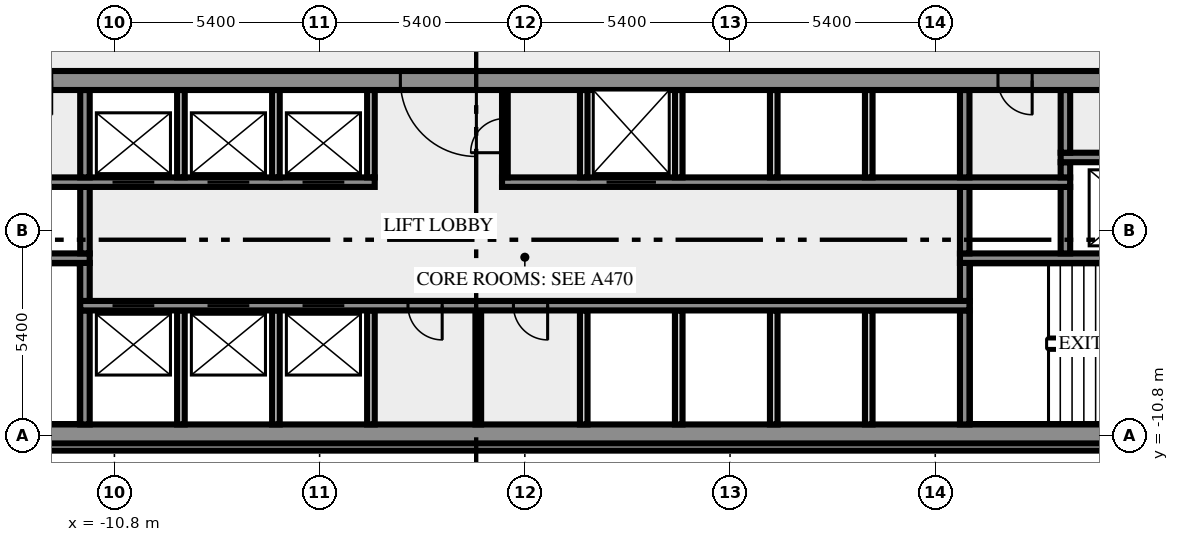
"""IFC4 building model, lengths in metres.
Left out: names, types, materials, properties, quantities, classifications, styles, units other than length and angle.
Written with IfcOpenShell. Run it as: python <this file> out.ifc"""

import sys

from ifc_helpers import new_model, si_unit, direction, frame, frame_2d, origin, place, context, subcontext, project, spatial, rectangle, extrude, element, fill, save


model = new_model("IFC4")
c1 = context("Model", 3, precision=1e-05, world=origin(), true_north=direction((0.0, 1.0)))
c2 = subcontext(c1, "Body", "Model", "MODEL_VIEW")
j1 = project(units=[si_unit("LENGTHUNIT", "METRE"), si_unit("PLANEANGLEUNIT", "RADIAN")], contexts=[c1])
p1 = place(None, origin())
s1 = spatial("IfcSite", under=j1, at=p1, CompositionType="ELEMENT")
p2 = place(p1, origin())
s2 = spatial("IfcBuilding", under=s1, at=p2, CompositionType="ELEMENT")
p3 = place(p2, frame((0.0, 0.0, 109.0)))
s3 = spatial("IfcBuildingStorey", under=s2, at=p3, CompositionType="ELEMENT", Elevation=109.0)
p4 = place(p3, frame((-17.444, -11.088, 0.0), z_axis=(0.0, 0.0, 1.0), x_axis=(1.0, 0.0, 0.0)))
e1 = element("IfcWall", 1, at=p4, inside=s3, PredefinedType="SOLIDWALL", context=c2, shape_type="SweptSolid", body=[
    extrude(rectangle(XDim=34.888, YDim=0.2, at=frame_2d((17.444, 0.0))), origin(), (0.0, 0.0, 1.0), 3.65),
])
p5 = place(p3, frame((-20.0, -10.75, 0.0), z_axis=(0.0, 0.0, 1.0), x_axis=(1.0, 0.0, 0.0)))
e2 = element("IfcWall", 2, at=p5, inside=s3, PredefinedType="SHEAR", context=c2, shape_type="SweptSolid", body=[
    extrude(rectangle(XDim=40.0, YDim=0.5, at=frame_2d((20.0, 0.0))), origin(), (0.0, 0.0, 1.0), 3.65),
])
p6 = place(p5, frame((0.8, 0.0, 1.0)))
e3 = element("IfcOpeningElement", 3, at=p6, cuts=e2, PredefinedType="OPENING", context=c2, shape_type="SweptSolid", body=[
    extrude(rectangle(XDim=1.2, YDim=1.2, at=frame_2d((0.6, 0.6))), frame((0.0, 0.26, 0.0), z_axis=(0.0, -1.0, 0.0), x_axis=(1.0, 0.0, 0.0)), (0.0, 0.0, 1.0), 0.52),
])
p7 = place(p5, frame((38.0, 0.0, 1.0)))
e4 = element("IfcOpeningElement", 4, at=p7, cuts=e2, PredefinedType="OPENING", context=c2, shape_type="SweptSolid", body=[
    extrude(rectangle(XDim=1.2, YDim=1.2, at=frame_2d((0.6, 0.6))), frame((0.0, 0.26, 0.0), z_axis=(0.0, -1.0, 0.0), x_axis=(1.0, 0.0, 0.0)), (0.0, 0.0, 1.0), 0.52),
])
p8 = place(p3, frame((-11.575, -10.5, 0.0), z_axis=(0.0, 0.0, 1.0), x_axis=(0.0, 1.0, 0.0)))
e5 = element("IfcWall", 5, at=p8, inside=s3, PredefinedType="SHEAR", context=c2, shape_type="SweptSolid", body=[
    extrude(rectangle(XDim=3.0, YDim=0.25, at=frame_2d((1.5, 0.0))), origin(), (0.0, 0.0, 1.0), 3.65),
])
for number, where, z_axis, x_axis in (
    (6, (-9.05, -10.5, 0.0), (0.0, 0.0, 1.0), (0.0, 1.0, 0.0)),
    (7, (-6.55, -10.5, 0.0), (0.0, 0.0, 1.0), (0.0, 1.0, 0.0)),
    (8, (-4.05, -10.5, 0.0), (0.0, 0.0, 1.0), (0.0, 1.0, 0.0)),
):
    element("IfcWall", number, at=place(p3, frame(where, z_axis=z_axis, x_axis=x_axis)), inside=s3, PredefinedType="SOLIDWALL", context=c2, shape_type="SweptSolid", body=[
        extrude(rectangle(XDim=3.0, YDim=0.2, at=frame_2d((1.5, 0.0))), origin(), (0.0, 0.0, 1.0), 3.65),
    ])
p9 = place(p3, frame((-1.225, -10.5, 0.0), z_axis=(0.0, 0.0, 1.0), x_axis=(0.0, 1.0, 0.0)))
e9 = element("IfcWall", 9, at=p9, inside=s3, PredefinedType="PARTITIONING", context=c2, shape_type="SweptSolid", body=[
    extrude(rectangle(XDim=3.0, YDim=0.15, at=frame_2d((1.5, 0.0))), origin(), (0.0, 0.0, 1.0), 3.65),
])
for number, where, z_axis, x_axis in (
    (10, (1.55, -10.5, 0.0), (0.0, 0.0, 1.0), (0.0, 1.0, 0.0)),
    (11, (4.05, -10.5, 0.0), (0.0, 0.0, 1.0), (0.0, 1.0, 0.0)),
    (12, (6.55, -10.5, 0.0), (0.0, 0.0, 1.0), (0.0, 1.0, 0.0)),
    (13, (9.05, -10.5, 0.0), (0.0, 0.0, 1.0), (0.0, 1.0, 0.0)),
):
    element("IfcWall", number, at=place(p3, frame(where, z_axis=z_axis, x_axis=x_axis)), inside=s3, PredefinedType="SOLIDWALL", context=c2, shape_type="SweptSolid", body=[
        extrude(rectangle(XDim=3.0, YDim=0.2, at=frame_2d((1.5, 0.0))), origin(), (0.0, 0.0, 1.0), 3.65),
    ])
p10 = place(p3, frame((11.575, -10.5, 0.0), z_axis=(0.0, 0.0, 1.0), x_axis=(0.0, 1.0, 0.0)))
e14 = element("IfcWall", 14, at=p10, inside=s3, PredefinedType="SHEAR", context=c2, shape_type="SweptSolid", body=[
    extrude(rectangle(XDim=3.0, YDim=0.25, at=frame_2d((1.5, 0.0))), origin(), (0.0, 0.0, 1.0), 3.65),
])
p11 = place(p3, frame((11.7, -7.375, 0.0), z_axis=(0.0, 0.0, 1.0), x_axis=(-1.0, 0.0, 0.0)))
e15 = element("IfcWall", 15, at=p11, inside=s3, PredefinedType="SHEAR", context=c2, shape_type="SweptSolid", body=[
    extrude(rectangle(XDim=23.4, YDim=0.25, at=frame_2d((11.7, 0.0))), origin(), (0.0, 0.0, 1.0), 3.65),
])
p12 = place(p11, frame((21.45, 0.0, 0.0)))
e16 = element("IfcOpeningElement", 16, at=p12, cuts=e15, PredefinedType="OPENING", context=c2, shape_type="SweptSolid", body=[
    extrude(rectangle(XDim=1.1, YDim=2.1, at=frame_2d((0.55, 1.05))), frame((0.0, 0.135, 0.0), z_axis=(0.0, -1.0, 0.0), x_axis=(1.0, 0.0, 0.0)), (0.0, 0.0, 1.0), 0.27),
])
p13 = place(p11, frame((18.95, 0.0, 0.0)))
e17 = element("IfcOpeningElement", 17, at=p13, cuts=e15, PredefinedType="OPENING", context=c2, shape_type="SweptSolid", body=[
    extrude(rectangle(XDim=1.1, YDim=2.1, at=frame_2d((0.55, 1.05))), frame((0.0, 0.135, 0.0), z_axis=(0.0, -1.0, 0.0), x_axis=(1.0, 0.0, 0.0)), (0.0, 0.0, 1.0), 0.27),
])
p14 = place(p11, frame((16.45, 0.0, 0.0)))
e18 = element("IfcOpeningElement", 18, at=p14, cuts=e15, PredefinedType="OPENING", context=c2, shape_type="SweptSolid", body=[
    extrude(rectangle(XDim=1.1, YDim=2.1, at=frame_2d((0.55, 1.05))), frame((0.0, 0.135, 0.0), z_axis=(0.0, -1.0, 0.0), x_axis=(1.0, 0.0, 0.0)), (0.0, 0.0, 1.0), 0.27),
])
p15 = place(p11, frame((13.875, 0.0, 0.0)))
e19 = element("IfcOpeningElement", 19, at=p15, cuts=e15, PredefinedType="OPENING", context=c2, shape_type="SweptSolid", body=[
    extrude(rectangle(XDim=0.9, YDim=2.1, at=frame_2d((0.45, 1.05))), frame((0.0, 0.135, 0.0), z_axis=(0.0, -1.0, 0.0), x_axis=(1.0, 0.0, 0.0)), (0.0, 0.0, 1.0), 0.27),
])
p16 = place(p11, frame((11.1, 0.0, 0.0)))
e20 = element("IfcOpeningElement", 20, at=p16, cuts=e15, PredefinedType="OPENING", context=c2, shape_type="SweptSolid", body=[
    extrude(rectangle(XDim=0.9, YDim=2.1, at=frame_2d((0.45, 1.05))), frame((0.0, 0.135, 0.0), z_axis=(0.0, -1.0, 0.0), x_axis=(1.0, 0.0, 0.0)), (0.0, 0.0, 1.0), 0.27),
])
for number, where, z_axis, x_axis in (
    (21, (-11.575, -7.25, 0.0), (0.0, 0.0, 1.0), (0.0, 1.0, 0.0)),
    (22, (11.575, -7.25, 0.0), (0.0, 0.0, 1.0), (0.0, 1.0, 0.0)),
):
    element("IfcWall", number, at=place(p3, frame(where, z_axis=z_axis, x_axis=x_axis)), inside=s3, PredefinedType="SHEAR", context=c2, shape_type="SweptSolid", body=[
        extrude(rectangle(XDim=1.0, YDim=0.25, at=frame_2d((0.5, 0.0))), origin(), (0.0, 0.0, 1.0), 3.65),
    ])
p17 = place(p3, frame((-11.45, -6.125, 0.0), z_axis=(0.0, 0.0, 1.0), x_axis=(-1.0, 0.0, 0.0)))
e23 = element("IfcWall", 23, at=p17, inside=s3, PredefinedType="SHEAR", context=c2, shape_type="SweptSolid", body=[
    extrude(rectangle(XDim=8.05, YDim=0.25, at=frame_2d((4.025, 0.0))), origin(), (0.0, 0.0, 1.0), 3.65),
])
p18 = place(p17, frame((6.2, 0.0, 0.0)))
e24 = element("IfcOpeningElement", 24, at=p18, cuts=e23, PredefinedType="OPENING", context=c2, shape_type="SweptSolid", body=[
    extrude(rectangle(XDim=1.8, YDim=2.1, at=frame_2d((0.9, 1.05))), frame((0.0, 0.135, 0.0), z_axis=(0.0, -1.0, 0.0), x_axis=(1.0, 0.0, 0.0)), (0.0, 0.0, 1.0), 0.27),
])
p19 = place(p3, frame((19.5, -6.125, 0.0), z_axis=(0.0, 0.0, 1.0), x_axis=(-1.0, 0.0, 0.0)))
e25 = element("IfcWall", 25, at=p19, inside=s3, PredefinedType="SHEAR", context=c2, shape_type="SweptSolid", body=[
    extrude(rectangle(XDim=8.05, YDim=0.25, at=frame_2d((4.025, 0.0))), origin(), (0.0, 0.0, 1.0), 3.65),
])
p20 = place(p19, frame((0.05, 0.0, 0.0)))
e26 = element("IfcOpeningElement", 26, at=p20, cuts=e25, PredefinedType="OPENING", context=c2, shape_type="SweptSolid", body=[
    extrude(rectangle(XDim=1.8, YDim=2.1, at=frame_2d((0.9, 1.05))), frame((0.0, 0.135, 0.0), z_axis=(0.0, -1.0, 0.0), x_axis=(1.0, 0.0, 0.0)), (0.0, 0.0, 1.0), 0.27),
])
for number, where, z_axis, x_axis in (
    (27, (-11.575, -6.0, 0.0), (0.0, 0.0, 1.0), (0.0, 1.0, 0.0)),
    (28, (11.575, -6.0, 0.0), (0.0, 0.0, 1.0), (0.0, 1.0, 0.0)),
    (29, (14.225, -6.0, 0.0), (0.0, 0.0, 1.0), (0.0, 1.0, 0.0)),
):
    element("IfcWall", number, at=place(p3, frame(where, z_axis=z_axis, x_axis=x_axis)), inside=s3, PredefinedType="SHEAR", context=c2, shape_type="SweptSolid", body=[
        extrude(rectangle(XDim=1.75, YDim=0.25, at=frame_2d((0.875, 0.0))), origin(), (0.0, 0.0, 1.0), 3.65),
    ])
p21 = place(p3, frame((-14.35, -4.125, 0.0), z_axis=(0.0, 0.0, 1.0), x_axis=(1.0, 0.0, 0.0)))
e30 = element("IfcWall", 30, at=p21, inside=s3, PredefinedType="SHEAR", context=c2, shape_type="SweptSolid", body=[
    extrude(rectangle(XDim=10.4, YDim=0.25, at=frame_2d((5.2, 0.0))), origin(), (0.0, 0.0, 1.0), 3.65),
])
p22 = place(p21, frame((3.5, 0.0, 0.0)))
e31 = element("IfcOpeningElement", 31, at=p22, cuts=e30, PredefinedType="OPENING", context=c2, shape_type="SweptSolid", body=[
    extrude(rectangle(XDim=1.1, YDim=2.1, at=frame_2d((0.55, 1.05))), frame((0.0, 0.135, 0.0), z_axis=(0.0, -1.0, 0.0), x_axis=(1.0, 0.0, 0.0)), (0.0, 0.0, 1.0), 0.27),
])
p23 = place(p21, frame((6.0, 0.0, 0.0)))
e32 = element("IfcOpeningElement", 32, at=p23, cuts=e30, PredefinedType="OPENING", context=c2, shape_type="SweptSolid", body=[
    extrude(rectangle(XDim=1.1, YDim=2.1, at=frame_2d((0.55, 1.05))), frame((0.0, 0.135, 0.0), z_axis=(0.0, -1.0, 0.0), x_axis=(1.0, 0.0, 0.0)), (0.0, 0.0, 1.0), 0.27),
])
p24 = place(p21, frame((8.5, 0.0, 0.0)))
e33 = element("IfcOpeningElement", 33, at=p24, cuts=e30, PredefinedType="OPENING", context=c2, shape_type="SweptSolid", body=[
    extrude(rectangle(XDim=1.1, YDim=2.1, at=frame_2d((0.55, 1.05))), frame((0.0, 0.135, 0.0), z_axis=(0.0, -1.0, 0.0), x_axis=(1.0, 0.0, 0.0)), (0.0, 0.0, 1.0), 0.27),
])
p25 = place(p3, frame((-0.6, -4.125, 0.0), z_axis=(0.0, 0.0, 1.0), x_axis=(1.0, 0.0, 0.0)))
e34 = element("IfcWall", 34, at=p25, inside=s3, PredefinedType="SHEAR", context=c2, shape_type="SweptSolid", body=[
    extrude(rectangle(XDim=14.95, YDim=0.25, at=frame_2d((7.475, 0.0))), origin(), (0.0, 0.0, 1.0), 3.65),
])
p26 = place(p25, frame((2.75, 0.0, 0.0)))
e35 = element("IfcOpeningElement", 35, at=p26, cuts=e34, PredefinedType="OPENING", context=c2, shape_type="SweptSolid", body=[
    extrude(rectangle(XDim=1.3, YDim=2.1, at=frame_2d((0.65, 1.05))), frame((0.0, 0.135, 0.0), z_axis=(0.0, -1.0, 0.0), x_axis=(1.0, 0.0, 0.0)), (0.0, 0.0, 1.0), 0.27),
])
p27 = place(p3, frame((-11.575, -4.0, 0.0), z_axis=(0.0, 0.0, 1.0), x_axis=(0.0, 1.0, 0.0)))
e36 = element("IfcWall", 36, at=p27, inside=s3, PredefinedType="SHEAR", context=c2, shape_type="SweptSolid", body=[
    extrude(rectangle(XDim=2.3, YDim=0.25, at=frame_2d((1.15, 0.0))), origin(), (0.0, 0.0, 1.0), 3.65),
])
for number, where, z_axis, x_axis in (
    (37, (-9.05, -4.0, 0.0), (0.0, 0.0, 1.0), (0.0, 1.0, 0.0)),
    (38, (-6.55, -4.0, 0.0), (0.0, 0.0, 1.0), (0.0, 1.0, 0.0)),
    (39, (-4.05, -4.0, 0.0), (0.0, 0.0, 1.0), (0.0, 1.0, 0.0)),
):
    element("IfcWall", number, at=place(p3, frame(where, z_axis=z_axis, x_axis=x_axis)), inside=s3, PredefinedType="SOLIDWALL", context=c2, shape_type="SweptSolid", body=[
        extrude(rectangle(XDim=2.3, YDim=0.2, at=frame_2d((1.15, 0.0))), origin(), (0.0, 0.0, 1.0), 3.65),
    ])
p28 = place(p3, frame((-0.525, -4.0, 0.0), z_axis=(0.0, 0.0, 1.0), x_axis=(0.0, 1.0, 0.0)))
e40 = element("IfcWall", 40, at=p28, inside=s3, PredefinedType="PARTITIONING", context=c2, shape_type="SweptSolid", body=[
    extrude(rectangle(XDim=2.3, YDim=0.15, at=frame_2d((1.15, 0.0))), origin(), (0.0, 0.0, 1.0), 3.65),
])
p29 = place(p28, frame((0.65, 0.0, 0.0)))
e41 = element("IfcOpeningElement", 41, at=p29, cuts=e40, PredefinedType="OPENING", context=c2, shape_type="SweptSolid", body=[
    extrude(rectangle(XDim=0.9, YDim=2.1, at=frame_2d((0.45, 1.05))), frame((0.0, 0.085, 0.0), z_axis=(0.0, -1.0, 0.0), x_axis=(1.0, 0.0, 0.0)), (0.0, 0.0, 1.0), 0.17),
])
for number, where, z_axis, x_axis in (
    (42, (1.55, -4.0, 0.0), (0.0, 0.0, 1.0), (0.0, 1.0, 0.0)),
    (43, (4.05, -4.0, 0.0), (0.0, 0.0, 1.0), (0.0, 1.0, 0.0)),
    (44, (6.55, -4.0, 0.0), (0.0, 0.0, 1.0), (0.0, 1.0, 0.0)),
    (45, (9.05, -4.0, 0.0), (0.0, 0.0, 1.0), (0.0, 1.0, 0.0)),
):
    element("IfcWall", number, at=place(p3, frame(where, z_axis=z_axis, x_axis=x_axis)), inside=s3, PredefinedType="SOLIDWALL", context=c2, shape_type="SweptSolid", body=[
        extrude(rectangle(XDim=2.3, YDim=0.2, at=frame_2d((1.15, 0.0))), origin(), (0.0, 0.0, 1.0), 3.65),
    ])
p30 = place(p3, frame((11.575, -4.0, 0.0), z_axis=(0.0, 0.0, 1.0), x_axis=(0.0, 1.0, 0.0)))
e46 = element("IfcWall", 46, at=p30, inside=s3, PredefinedType="SHEAR", context=c2, shape_type="SweptSolid", body=[
    extrude(rectangle(XDim=2.3, YDim=0.25, at=frame_2d((1.15, 0.0))), origin(), (0.0, 0.0, 1.0), 3.65),
])
p31 = place(p3, frame((14.225, -4.0, 0.0), z_axis=(0.0, 0.0, 1.0), x_axis=(0.0, 1.0, 0.0)))
e47 = element("IfcWall", 47, at=p31, inside=s3, PredefinedType="SHEAR", context=c2, shape_type="SweptSolid", body=[
    extrude(rectangle(XDim=0.4, YDim=0.25, at=frame_2d((0.2, 0.0))), origin(), (0.0, 0.0, 1.0), 3.65),
])
p32 = place(p3, frame((14.1, -3.475, 0.0), z_axis=(0.0, 0.0, 1.0), x_axis=(1.0, 0.0, 0.0)))
e48 = element("IfcWall", 48, at=p32, inside=s3, PredefinedType="SHEAR", context=c2, shape_type="SweptSolid", body=[
    extrude(rectangle(XDim=3.25, YDim=0.25, at=frame_2d((1.625, 0.0))), origin(), (0.0, 0.0, 1.0), 3.65),
])
p33 = place(p3, frame((14.225, -3.35, 0.0), z_axis=(0.0, 0.0, 1.0), x_axis=(0.0, 1.0, 0.0)))
e49 = element("IfcWall", 49, at=p33, inside=s3, PredefinedType="SHEAR", context=c2, shape_type="SweptSolid", body=[
    extrude(rectangle(XDim=1.65, YDim=0.25, at=frame_2d((0.825, 0.0))), origin(), (0.0, 0.0, 1.0), 3.65),
])
p34 = place(p3, frame((20.49, -1.45, 0.0), z_axis=(0.0, 0.0, 1.0), x_axis=(-1.0, 0.0, 0.0)))
e50 = element("IfcWall", 50, at=p34, inside=s3, PredefinedType="SHEAR", context=c2, shape_type="SweptSolid", body=[
    extrude(rectangle(XDim=40.98, YDim=0.5, at=frame_2d((20.49, 0.0))), origin(), (0.0, 0.0, 1.0), 3.65),
])
p35 = place(p34, frame((38.14, 0.0, 0.0)))
e51 = element("IfcOpeningElement", 51, at=p35, cuts=e50, PredefinedType="OPENING", context=c2, shape_type="SweptSolid", body=[
    extrude(rectangle(XDim=1.8, YDim=2.1, at=frame_2d((0.9, 1.05))), frame((0.0, 0.26, 0.0), z_axis=(0.0, -1.0, 0.0), x_axis=(1.0, 0.0, 0.0)), (0.0, 0.0, 1.0), 0.52),
])
p36 = place(p34, frame((36.728, 0.0, 0.0)))
e52 = element("IfcOpeningElement", 52, at=p36, cuts=e50, PredefinedType="OPENING", context=c2, shape_type="SweptSolid", body=[
    extrude(rectangle(XDim=0.8, YDim=2.1, at=frame_2d((0.4, 1.05))), frame((0.0, 0.26, 0.0), z_axis=(0.0, -1.0, 0.0), x_axis=(1.0, 0.0, 0.0)), (0.0, 0.0, 1.0), 0.52),
])
p37 = place(p34, frame((35.153, 0.0, 0.0)))
e53 = element("IfcOpeningElement", 53, at=p37, cuts=e50, PredefinedType="OPENING", context=c2, shape_type="SweptSolid", body=[
    extrude(rectangle(XDim=0.8, YDim=2.1, at=frame_2d((0.4, 1.05))), frame((0.0, 0.26, 0.0), z_axis=(0.0, -1.0, 0.0), x_axis=(1.0, 0.0, 0.0)), (0.0, 0.0, 1.0), 0.52),
])
p38 = place(p34, frame((32.94, 0.0, 0.0)))
e54 = element("IfcOpeningElement", 54, at=p38, cuts=e50, PredefinedType="OPENING", context=c2, shape_type="SweptSolid", body=[
    extrude(rectangle(XDim=0.9, YDim=2.1, at=frame_2d((0.45, 1.05))), frame((0.0, 0.26, 0.0), z_axis=(0.0, -1.0, 0.0), x_axis=(1.0, 0.0, 0.0)), (0.0, 0.0, 1.0), 0.52),
])
p39 = place(p34, frame((21.765, 0.0, 0.0)))
e55 = element("IfcOpeningElement", 55, at=p39, cuts=e50, PredefinedType="OPENING", context=c2, shape_type="SweptSolid", body=[
    extrude(rectangle(XDim=2.0, YDim=2.1, at=frame_2d((1.0, 1.05))), frame((0.0, 0.26, 0.0), z_axis=(0.0, -1.0, 0.0), x_axis=(1.0, 0.0, 0.0)), (0.0, 0.0, 1.0), 0.52),
])
p40 = place(p34, frame((7.14, 0.0, 0.0)))
e56 = element("IfcOpeningElement", 56, at=p40, cuts=e50, PredefinedType="OPENING", context=c2, shape_type="SweptSolid", body=[
    extrude(rectangle(XDim=0.9, YDim=2.1, at=frame_2d((0.45, 1.05))), frame((0.0, 0.26, 0.0), z_axis=(0.0, -1.0, 0.0), x_axis=(1.0, 0.0, 0.0)), (0.0, 0.0, 1.0), 0.52),
])
p41 = place(p34, frame((4.19, 0.0, 0.0)))
e57 = element("IfcOpeningElement", 57, at=p41, cuts=e50, PredefinedType="OPENING", context=c2, shape_type="SweptSolid", body=[
    extrude(rectangle(XDim=0.9, YDim=2.1, at=frame_2d((0.45, 1.05))), frame((0.0, 0.26, 0.0), z_axis=(0.0, -1.0, 0.0), x_axis=(1.0, 0.0, 0.0)), (0.0, 0.0, 1.0), 0.52),
])
p42 = place(p34, frame((1.04, 0.0, 0.0)))
e58 = element("IfcOpeningElement", 58, at=p42, cuts=e50, PredefinedType="OPENING", context=c2, shape_type="SweptSolid", body=[
    extrude(rectangle(XDim=1.8, YDim=2.1, at=frame_2d((0.9, 1.05))), frame((0.0, 0.26, 0.0), z_axis=(0.0, -1.0, 0.0), x_axis=(1.0, 0.0, 0.0)), (0.0, 0.0, 1.0), 0.52),
])
p43 = place(p12, origin())
e59 = element("IfcDoor", 59, at=p43, inside=s3, OperationType="DOUBLE_DOOR_SLIDING", PredefinedType="DOOR", context=c2, shape_type="SweptSolid", body=[
    extrude(rectangle(XDim=1.1, YDim=2.1, at=frame_2d((0.55, 1.05))), frame((0.0, 0.025, 0.0), z_axis=(0.0, -1.0, 0.0), x_axis=(1.0, 0.0, 0.0)), (0.0, 0.0, 1.0), 0.05),
])
fill(e16, e59)
p44 = place(p13, origin())
e60 = element("IfcDoor", 60, at=p44, inside=s3, OperationType="DOUBLE_DOOR_SLIDING", PredefinedType="DOOR", context=c2, shape_type="SweptSolid", body=[
    extrude(rectangle(XDim=1.1, YDim=2.1, at=frame_2d((0.55, 1.05))), frame((0.0, 0.025, 0.0), z_axis=(0.0, -1.0, 0.0), x_axis=(1.0, 0.0, 0.0)), (0.0, 0.0, 1.0), 0.05),
])
fill(e17, e60)
p45 = place(p14, origin())
e61 = element("IfcDoor", 61, at=p45, inside=s3, OperationType="DOUBLE_DOOR_SLIDING", PredefinedType="DOOR", context=c2, shape_type="SweptSolid", body=[
    extrude(rectangle(XDim=1.1, YDim=2.1, at=frame_2d((0.55, 1.05))), frame((0.0, 0.025, 0.0), z_axis=(0.0, -1.0, 0.0), x_axis=(1.0, 0.0, 0.0)), (0.0, 0.0, 1.0), 0.05),
])
fill(e18, e61)
p46 = place(p15, origin())
e62 = element("IfcDoor", 62, at=p46, inside=s3, OperationType="SINGLE_SWING_RIGHT", PredefinedType="DOOR", context=c2, shape_type="SweptSolid", body=[
    extrude(rectangle(XDim=0.9, YDim=2.1, at=frame_2d((0.45, 1.05))), frame((0.0, 0.025, 0.0), z_axis=(0.0, -1.0, 0.0), x_axis=(1.0, 0.0, 0.0)), (0.0, 0.0, 1.0), 0.05),
])
fill(e19, e62)
p47 = place(p16, origin())
e63 = element("IfcDoor", 63, at=p47, inside=s3, OperationType="SINGLE_SWING_LEFT", PredefinedType="DOOR", context=c2, shape_type="SweptSolid", body=[
    extrude(rectangle(XDim=0.9, YDim=2.1, at=frame_2d((0.45, 1.05))), frame((0.0, 0.025, 0.0), z_axis=(0.0, -1.0, 0.0), x_axis=(1.0, 0.0, 0.0)), (0.0, 0.0, 1.0), 0.05),
])
fill(e20, e63)
p48 = place(p22, origin())
e64 = element("IfcDoor", 64, at=p48, inside=s3, OperationType="DOUBLE_DOOR_SLIDING", PredefinedType="DOOR", context=c2, shape_type="SweptSolid", body=[
    extrude(rectangle(XDim=1.1, YDim=2.1, at=frame_2d((0.55, 1.05))), frame((0.0, 0.025, 0.0), z_axis=(0.0, -1.0, 0.0), x_axis=(1.0, 0.0, 0.0)), (0.0, 0.0, 1.0), 0.05),
])
fill(e31, e64)
p49 = place(p23, origin())
e65 = element("IfcDoor", 65, at=p49, inside=s3, OperationType="DOUBLE_DOOR_SLIDING", PredefinedType="DOOR", context=c2, shape_type="SweptSolid", body=[
    extrude(rectangle(XDim=1.1, YDim=2.1, at=frame_2d((0.55, 1.05))), frame((0.0, 0.025, 0.0), z_axis=(0.0, -1.0, 0.0), x_axis=(1.0, 0.0, 0.0)), (0.0, 0.0, 1.0), 0.05),
])
fill(e32, e65)
p50 = place(p24, origin())
e66 = element("IfcDoor", 66, at=p50, inside=s3, OperationType="DOUBLE_DOOR_SLIDING", PredefinedType="DOOR", context=c2, shape_type="SweptSolid", body=[
    extrude(rectangle(XDim=1.1, YDim=2.1, at=frame_2d((0.55, 1.05))), frame((0.0, 0.025, 0.0), z_axis=(0.0, -1.0, 0.0), x_axis=(1.0, 0.0, 0.0)), (0.0, 0.0, 1.0), 0.05),
])
fill(e33, e66)
p51 = place(p26, origin())
e67 = element("IfcDoor", 67, at=p51, inside=s3, OperationType="DOUBLE_DOOR_SLIDING", PredefinedType="DOOR", context=c2, shape_type="SweptSolid", body=[
    extrude(rectangle(XDim=1.3, YDim=2.1, at=frame_2d((0.65, 1.05))), frame((0.0, 0.025, 0.0), z_axis=(0.0, -1.0, 0.0), x_axis=(1.0, 0.0, 0.0)), (0.0, 0.0, 1.0), 0.05),
])
fill(e35, e67)
p52 = place(p29, origin())
e68 = element("IfcDoor", 68, at=p52, inside=s3, OperationType="SINGLE_SWING_LEFT", PredefinedType="DOOR", context=c2, shape_type="SweptSolid", body=[
    extrude(rectangle(XDim=0.9, YDim=2.1, at=frame_2d((0.45, 1.05))), frame((0.0, 0.025, 0.0), z_axis=(0.0, -1.0, 0.0), x_axis=(1.0, 0.0, 0.0)), (0.0, 0.0, 1.0), 0.05),
])
fill(e41, e68)
p53 = place(p39, origin())
e69 = element("IfcDoor", 69, at=p53, inside=s3, OperationType="DOUBLE_DOOR_SINGLE_SWING", PredefinedType="DOOR", context=c2, shape_type="SweptSolid", body=[
    extrude(rectangle(XDim=2.0, YDim=2.1, at=frame_2d((1.0, 1.05))), frame((0.0, 0.025, 0.0), z_axis=(0.0, -1.0, 0.0), x_axis=(1.0, 0.0, 0.0)), (0.0, 0.0, 1.0), 0.05),
])
fill(e55, e69)
p54 = place(p40, origin())
e70 = element("IfcDoor", 70, at=p54, inside=s3, OperationType="SINGLE_SWING_LEFT", PredefinedType="DOOR", context=c2, shape_type="SweptSolid", body=[
    extrude(rectangle(XDim=0.9, YDim=2.1, at=frame_2d((0.45, 1.05))), frame((0.0, 0.025, 0.0), z_axis=(0.0, -1.0, 0.0), x_axis=(1.0, 0.0, 0.0)), (0.0, 0.0, 1.0), 0.05),
])
fill(e56, e70)
save(model, sys.argv[1])
